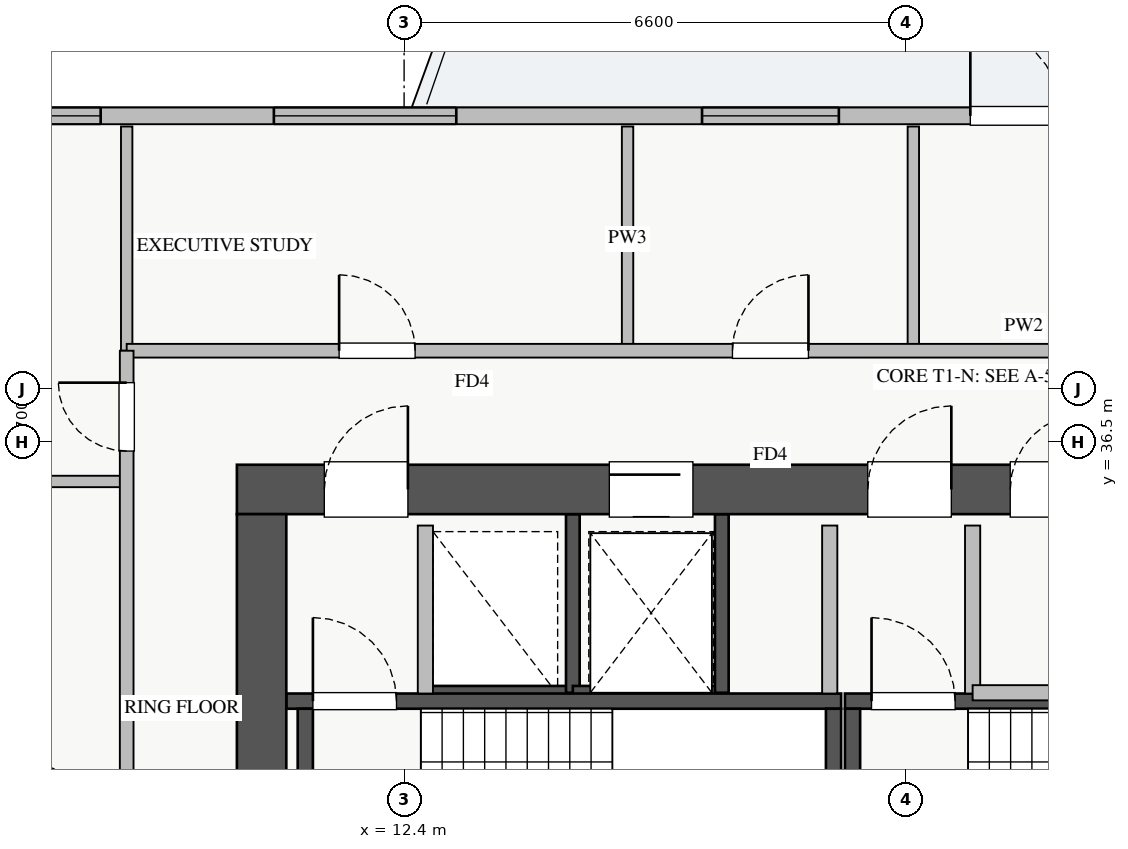
"""IFC4 building model, lengths in metres.
Left out: names, types, materials, properties, quantities, classifications, styles, units other than length and angle.
Written with IfcOpenShell. Run it as: python <this file> out.ifc"""

import sys

from ifc_helpers import new_model, si_unit, direction, frame, frame_2d, origin, place, context, subcontext, project, spatial, rectangle, extrude, source, transform, mapped, element, fill, save


model = new_model("IFC4")
c1 = context("Model", 3, precision=1e-05, world=origin(), true_north=direction((0.0, 1.0)))
c2 = subcontext(c1, "Body", "Model", "MODEL_VIEW")
j1 = project(units=[si_unit("LENGTHUNIT", "METRE"), si_unit("PLANEANGLEUNIT", "RADIAN")], contexts=[c1])
p1 = place(None, origin())
s1 = spatial("IfcSite", under=j1, at=p1, CompositionType="ELEMENT")
p2 = place(p1, origin())
s2 = spatial("IfcBuilding", under=s1, at=p2, CompositionType="ELEMENT")
p3 = place(p2, frame((0.0, 0.0, 147.0)))
s3 = spatial("IfcBuildingStorey", under=s2, at=p3, CompositionType="ELEMENT", Elevation=147.0)
p4 = place(p3, frame((12.68, 33.2, 0.0), z_axis=(0.0, 0.0, 1.0), x_axis=(1.0, 0.0, 0.0)))
e1 = element("IfcWall", 1, at=p4, inside=s3, PredefinedType="SHEAR", context=c2, shape_type="SweptSolid", body=[
    extrude(rectangle(XDim=1.94, YDim=0.18, at=frame_2d((0.97, 0.0))), origin(), (0.0, 0.0, 1.0), 3.07),
])
p5 = place(p3, frame((14.62, 33.2, 0.0), z_axis=(0.0, 0.0, 1.0), x_axis=(0.0, 1.0, 0.0)))
e2 = element("IfcWall", 2, at=p5, inside=s3, PredefinedType="SHEAR", context=c2, shape_type="SweptSolid", body=[
    extrude(rectangle(XDim=2.35, YDim=0.18, at=frame_2d((1.175, 0.0))), origin(), (0.0, 0.0, 1.0), 3.07),
])
p6 = place(p3, frame((14.62, 33.2, 0.0), z_axis=(0.0, 0.0, 1.0), x_axis=(1.0, 0.0, 0.0)))
e3 = element("IfcWall", 3, at=p6, inside=s3, PredefinedType="SHEAR", context=c2, shape_type="SweptSolid", body=[
    extrude(rectangle(XDim=1.96, YDim=0.18, at=frame_2d((0.98, 0.0))), origin(), (0.0, 0.0, 1.0), 3.07),
])
p7 = place(p3, frame((16.58, 33.2, 0.0), z_axis=(0.0, 0.0, 1.0), x_axis=(0.0, 1.0, 0.0)))
e4 = element("IfcWall", 4, at=p7, inside=s3, PredefinedType="SHEAR", context=c2, shape_type="SweptSolid", body=[
    extrude(rectangle(XDim=2.35, YDim=0.18, at=frame_2d((1.175, 0.0))), origin(), (0.0, 0.0, 1.0), 3.07),
])
p8 = place(p3, frame((10.85, 33.09, 0.0), z_axis=(0.0, 0.0, 1.0), x_axis=(1.0, 0.0, 0.0)))
e5 = element("IfcWall", 5, at=p8, inside=s3, PredefinedType="SHEAR", context=c2, shape_type="SweptSolid", body=[
    extrude(rectangle(XDim=7.3, YDim=0.2, at=frame_2d((3.65, 0.0))), origin(), (0.0, 0.0, 1.0), 3.25),
])
p9 = place(p8, frame((0.35, 0.0, 0.0)))
e6 = element("IfcOpeningElement", 6, at=p9, cuts=e5, PredefinedType="OPENING", context=c2, shape_type="SweptSolid", body=[
    extrude(rectangle(XDim=1.1, YDim=2.05, at=frame_2d((0.55, 1.025))), frame((0.0, 0.11, 0.0), z_axis=(0.0, -1.0, 0.0), x_axis=(1.0, 0.0, 0.0)), (0.0, 0.0, 1.0), 0.22),
])
for number, where, z_axis, x_axis in (
    (7, (11.1, 30.05, 0.0), (0.0, 0.0, 1.0), (0.0, 1.0, 0.0)),
    (8, (18.05, 30.05, 0.0), (0.0, 0.0, 1.0), (0.0, 1.0, 0.0)),
):
    element("IfcWall", number, at=place(p3, frame(where, z_axis=z_axis, x_axis=x_axis)), inside=s3, PredefinedType="SHEAR", context=c2, shape_type="SweptSolid", body=[
        extrude(rectangle(XDim=2.94, YDim=0.2, at=frame_2d((1.47, 0.0))), origin(), (0.0, 0.0, 1.0), 3.25),
    ])
p10 = place(p3, frame((18.2, 33.09, 0.0), z_axis=(0.0, 0.0, 1.0), x_axis=(1.0, 0.0, 0.0)))
e9 = element("IfcWall", 9, at=p10, inside=s3, PredefinedType="SHEAR", context=c2, shape_type="SweptSolid", body=[
    extrude(rectangle(XDim=7.15, YDim=0.2, at=frame_2d((3.575, 0.0))), origin(), (0.0, 0.0, 1.0), 3.25),
])
p11 = place(p10, frame((0.35, 0.0, 0.0)))
e10 = element("IfcOpeningElement", 10, at=p11, cuts=e9, PredefinedType="OPENING", context=c2, shape_type="SweptSolid", body=[
    extrude(rectangle(XDim=1.1, YDim=2.05, at=frame_2d((0.55, 1.025))), frame((0.0, 0.11, 0.0), z_axis=(0.0, -1.0, 0.0), x_axis=(1.0, 0.0, 0.0)), (0.0, 0.0, 1.0), 0.22),
])
p12 = place(p3, frame((18.3, 30.05, 0.0), z_axis=(0.0, 0.0, 1.0), x_axis=(0.0, 1.0, 0.0)))
e11 = element("IfcWall", 11, at=p12, inside=s3, PredefinedType="SHEAR", context=c2, shape_type="SweptSolid", body=[
    extrude(rectangle(XDim=2.94, YDim=0.2, at=frame_2d((1.47, 0.0))), origin(), (0.0, 0.0, 1.0), 3.25),
])
p13 = place(p3, frame((10.2, 35.875, 0.0), z_axis=(0.0, 0.0, 1.0), x_axis=(1.0, 0.0, 0.0)))
e12 = element("IfcWall", 12, at=p13, inside=s3, PredefinedType="SHEAR", context=c2, shape_type="SweptSolid", body=[
    extrude(rectangle(XDim=17.6, YDim=0.65, at=frame_2d((8.8, 0.0))), origin(), (0.0, 0.0, 1.0), 3.25),
])
p14 = place(p13, frame((1.15, 0.0, 0.0)))
e13 = element("IfcOpeningElement", 13, at=p14, cuts=e12, PredefinedType="OPENING", context=c2, shape_type="SweptSolid", body=[
    extrude(rectangle(XDim=1.1, YDim=2.05, at=frame_2d((0.55, 1.025))), frame((0.0, 0.335, 0.0), z_axis=(0.0, -1.0, 0.0), x_axis=(1.0, 0.0, 0.0)), (0.0, 0.0, 1.0), 0.67),
])
p15 = place(p13, frame((8.3, 0.0, 0.0)))
e14 = element("IfcOpeningElement", 14, at=p15, cuts=e12, PredefinedType="OPENING", context=c2, shape_type="SweptSolid", body=[
    extrude(rectangle(XDim=1.1, YDim=2.05, at=frame_2d((0.55, 1.025))), frame((0.0, 0.335, 0.0), z_axis=(0.0, -1.0, 0.0), x_axis=(1.0, 0.0, 0.0)), (0.0, 0.0, 1.0), 0.67),
])
p16 = place(p13, frame((4.9, 0.0, 0.0)))
e15 = element("IfcOpeningElement", 15, at=p16, cuts=e12, PredefinedType="OPENING", context=c2, shape_type="SweptSolid", body=[
    extrude(rectangle(XDim=1.1, YDim=2.05, at=frame_2d((0.55, 1.025))), frame((0.0, 0.335, 0.0), z_axis=(0.0, -1.0, 0.0), x_axis=(1.0, 0.0, 0.0)), (0.0, 0.0, 1.0), 0.67),
])
p17 = place(p13, frame((14.74, 0.0, 0.0)))
e16 = element("IfcOpeningElement", 16, at=p17, cuts=e12, PredefinedType="OPENING", context=c2, shape_type="SweptSolid", body=[
    extrude(rectangle(XDim=1.0, YDim=2.05, at=frame_2d((0.5, 1.025))), frame((0.0, 0.335, 0.0), z_axis=(0.0, -1.0, 0.0), x_axis=(1.0, 0.0, 0.0)), (0.0, 0.0, 1.0), 0.67),
])
p18 = place(p13, frame((10.175, 0.0, 0.0)))
e17 = element("IfcOpeningElement", 17, at=p18, cuts=e12, PredefinedType="OPENING", context=c2, shape_type="SweptSolid", body=[
    extrude(rectangle(XDim=1.0, YDim=2.05, at=frame_2d((0.5, 1.025))), frame((0.0, 0.335, 0.0), z_axis=(0.0, -1.0, 0.0), x_axis=(1.0, 0.0, 0.0)), (0.0, 0.0, 1.0), 0.67),
])
p19 = place(p13, frame((12.625, 0.0, 0.0)))
e18 = element("IfcOpeningElement", 18, at=p19, cuts=e12, PredefinedType="OPENING", context=c2, shape_type="SweptSolid", body=[
    extrude(rectangle(XDim=1.0, YDim=2.05, at=frame_2d((0.5, 1.025))), frame((0.0, 0.335, 0.0), z_axis=(0.0, -1.0, 0.0), x_axis=(1.0, 0.0, 0.0)), (0.0, 0.0, 1.0), 0.67),
])
p20 = place(p3, frame((10.525, 29.65, 0.0), z_axis=(0.0, 0.0, 1.0), x_axis=(0.0, 1.0, 0.0)))
e19 = element("IfcWall", 19, at=p20, inside=s3, PredefinedType="SHEAR", context=c2, shape_type="SweptSolid", body=[
    extrude(rectangle(XDim=5.9, YDim=0.65, at=frame_2d((2.95, 0.0))), origin(), (0.0, 0.0, 1.0), 3.25),
])
p21 = place(p3, frame((6.55, 40.79, 0.0), z_axis=(0.0, 0.0, 1.0), x_axis=(1.0, 0.0, 0.0)))
e20 = element("IfcWall", 20, at=p21, inside=s3, PredefinedType="STANDARD", context=c2, shape_type="SweptSolid", body=[
    extrude(rectangle(XDim=24.9, YDim=0.22, at=frame_2d((12.45, 0.0))), origin(), (0.0, 0.0, 1.0), 2.61),
])
p22 = place(p21, frame((13.3, 0.0, 0.0)))
e21 = element("IfcOpeningElement", 21, at=p22, cuts=e20, PredefinedType="OPENING", context=c2, shape_type="SweptSolid", body=[
    extrude(rectangle(XDim=1.2, YDim=2.1, at=frame_2d((0.6, 1.05))), frame((0.0, 0.12, 0.0), z_axis=(0.0, -1.0, 0.0), x_axis=(1.0, 0.0, 0.0)), (0.0, 0.0, 1.0), 0.24),
])
p23 = place(p21, frame((0.357, 0.0, 0.9)))
e22 = element("IfcOpeningElement", 22, at=p23, cuts=e20, PredefinedType="OPENING", context=c2, shape_type="SweptSolid", body=[
    extrude(rectangle(XDim=1.5, YDim=1.5, at=frame_2d((0.75, 0.75))), frame((0.0, 0.12, 0.0), z_axis=(0.0, -1.0, 0.0), x_axis=(1.0, 0.0, 0.0)), (0.0, 0.0, 1.0), 0.24),
])
p24 = place(p21, frame((9.77, 0.0, 0.9)))
e23 = element("IfcOpeningElement", 23, at=p24, cuts=e20, PredefinedType="OPENING", context=c2, shape_type="SweptSolid", body=[
    extrude(rectangle(XDim=1.8, YDim=1.5, at=frame_2d((0.9, 0.75))), frame((0.0, 0.12, 0.0), z_axis=(0.0, -1.0, 0.0), x_axis=(1.0, 0.0, 0.0)), (0.0, 0.0, 1.0), 0.24),
])
p25 = place(p21, frame((14.813, 0.0, 0.9)))
e24 = element("IfcOpeningElement", 24, at=p25, cuts=e20, PredefinedType="OPENING", context=c2, shape_type="SweptSolid", body=[
    extrude(rectangle(XDim=1.5, YDim=1.45, at=frame_2d((0.75, 0.725))), frame((0.0, 0.12, 0.0), z_axis=(0.0, -1.0, 0.0), x_axis=(1.0, 0.0, 0.0)), (0.0, 0.0, 1.0), 0.24),
])
p26 = place(p21, frame((20.738, 0.0, 0.9)))
e25 = element("IfcOpeningElement", 25, at=p26, cuts=e20, PredefinedType="OPENING", context=c2, shape_type="SweptSolid", body=[
    extrude(rectangle(XDim=2.1, YDim=1.48, at=frame_2d((1.05, 0.74))), frame((0.0, 0.12, 0.0), z_axis=(0.0, -1.0, 0.0), x_axis=(1.0, 0.0, 0.0)), (0.0, 0.0, 1.0), 0.24),
])
p27 = place(p21, frame((4.136, 0.0, 0.9)))
e26 = element("IfcOpeningElement", 26, at=p27, cuts=e20, PredefinedType="OPENING", context=c2, shape_type="SweptSolid", body=[
    extrude(rectangle(XDim=2.4, YDim=1.5, at=frame_2d((1.2, 0.75))), frame((0.0, 0.12, 0.0), z_axis=(0.0, -1.0, 0.0), x_axis=(1.0, 0.0, 0.0)), (0.0, 0.0, 1.0), 0.24),
])
for number, where, z_axis, x_axis in (
    (27, (12.68, 33.19, 0.0), (0.0, 0.0, 1.0), (0.0, 1.0, 0.0)),
    (28, (18.0, 33.19, 0.0), (0.0, 0.0, 1.0), (0.0, 1.0, 0.0)),
    (29, (19.88, 33.19, 0.0), (0.0, 0.0, 1.0), (0.0, 1.0, 0.0)),
):
    element("IfcWall", number, at=place(p3, frame(where, z_axis=z_axis, x_axis=x_axis)), inside=s3, PredefinedType="PARTITIONING", context=c2, shape_type="SweptSolid", body=[
        extrude(rectangle(XDim=2.21, YDim=0.2, at=frame_2d((1.105, 0.0))), origin(), (0.0, 0.0, 1.0), 3.07),
    ])
p28 = place(p3, frame((19.88, 33.2, 0.0), z_axis=(0.0, 0.0, 1.0), x_axis=(1.0, 0.0, 0.0)))
e30 = element("IfcWall", 30, at=p28, inside=s3, PredefinedType="PARTITIONING", context=c2, shape_type="SweptSolid", body=[
    extrude(rectangle(XDim=1.87, YDim=0.2, at=frame_2d((0.935, 0.0))), origin(), (0.0, 0.0, 1.0), 3.07),
])
p29 = place(p3, frame((15.34, 37.7, 0.0), z_axis=(0.0, 0.0, 1.0), x_axis=(0.0, 1.0, 0.0)))
e31 = element("IfcWall", 31, at=p29, inside=s3, PredefinedType="PARTITIONING", context=c2, shape_type="SweptSolid", body=[
    extrude(rectangle(XDim=2.95, YDim=0.15, at=frame_2d((1.475, 0.0))), origin(), (0.0, 0.0, 1.0), 3.07),
])
p30 = place(p3, frame((19.1, 37.7, 0.0), z_axis=(0.0, 0.0, 1.0), x_axis=(0.0, 1.0, 0.0)))
e32 = element("IfcWall", 32, at=p30, inside=s3, PredefinedType="PARTITIONING", context=c2, shape_type="SweptSolid", body=[
    extrude(rectangle(XDim=2.95, YDim=0.15, at=frame_2d((1.475, 0.0))), origin(), (0.0, 0.0, 1.0), 2.715),
])
p31 = place(p3, frame((8.75, 37.7, 0.0), z_axis=(0.0, 0.0, 1.0), x_axis=(0.0, 1.0, 0.0)))
e33 = element("IfcWall", 33, at=p31, inside=s3, PredefinedType="PARTITIONING", context=c2, shape_type="SweptSolid", body=[
    extrude(rectangle(XDim=2.95, YDim=0.15, at=frame_2d((1.475, 0.0))), origin(), (0.0, 0.0, 1.0), 3.07),
])
p32 = place(p3, frame((8.75, 37.7, 0.0), z_axis=(0.0, 0.0, 1.0), x_axis=(1.0, 0.0, 0.0)))
e34 = element("IfcWall", 34, at=p32, inside=s3, PredefinedType="PARTITIONING", context=c2, shape_type="SweptSolid", body=[
    extrude(rectangle(XDim=23.61, YDim=0.18, at=frame_2d((11.805, 0.0))), origin(), (0.0, 0.0, 1.0), 3.07),
])
p33 = place(p32, frame((2.795, 0.0, 0.0)))
e35 = element("IfcOpeningElement", 35, at=p33, cuts=e34, PredefinedType="OPENING", context=c2, shape_type="SweptSolid", body=[
    extrude(rectangle(XDim=1.0, YDim=2.05, at=frame_2d((0.5, 1.025))), frame((0.0, 0.1, 0.0), z_axis=(0.0, -1.0, 0.0), x_axis=(1.0, 0.0, 0.0)), (0.0, 0.0, 1.0), 0.2),
])
p34 = place(p32, frame((7.97, 0.0, 0.0)))
e36 = element("IfcOpeningElement", 36, at=p34, cuts=e34, PredefinedType="OPENING", context=c2, shape_type="SweptSolid", body=[
    extrude(rectangle(XDim=1.0, YDim=2.05, at=frame_2d((0.5, 1.025))), frame((0.0, 0.1, 0.0), z_axis=(0.0, -1.0, 0.0), x_axis=(1.0, 0.0, 0.0)), (0.0, 0.0, 1.0), 0.2),
])
p35 = place(p32, frame((13.385, 0.0, 0.0)))
e37 = element("IfcOpeningElement", 37, at=p35, cuts=e34, PredefinedType="OPENING", context=c2, shape_type="SweptSolid", body=[
    extrude(rectangle(XDim=1.0, YDim=2.05, at=frame_2d((0.5, 1.025))), frame((0.0, 0.1, 0.0), z_axis=(0.0, -1.0, 0.0), x_axis=(1.0, 0.0, 0.0)), (0.0, 0.0, 1.0), 0.2),
])
p36 = place(p32, frame((19.825, 0.0, 0.0)))
e38 = element("IfcOpeningElement", 38, at=p36, cuts=e34, PredefinedType="OPENING", context=c2, shape_type="SweptSolid", body=[
    extrude(rectangle(XDim=1.0, YDim=2.05, at=frame_2d((0.5, 1.025))), frame((0.0, 0.1, 0.0), z_axis=(0.0, -1.0, 0.0), x_axis=(1.0, 0.0, 0.0)), (0.0, 0.0, 1.0), 0.2),
])
p37 = place(p3, frame((1.35, 35.98, 0.0), z_axis=(0.0, 0.0, 1.0), x_axis=(1.0, 0.0, 0.0)))
e39 = element("IfcWall", 39, at=p37, inside=s3, PredefinedType="PARTITIONING", context=c2, shape_type="SweptSolid", body=[
    extrude(rectangle(XDim=7.4, YDim=0.15, at=frame_2d((3.7, 0.0))), origin(), (0.0, 0.0, 1.0), 3.07),
])
p38 = place(p3, frame((8.75, 8.3, 0.0), z_axis=(0.0, 0.0, 1.0), x_axis=(0.0, 1.0, 0.0)))
e40 = element("IfcWall", 40, at=p38, inside=s3, PredefinedType="PARTITIONING", context=c2, shape_type="SweptSolid", body=[
    extrude(rectangle(XDim=29.4, YDim=0.18, at=frame_2d((14.7, 0.0))), origin(), (0.0, 0.0, 1.0), 3.07),
])
p39 = place(p38, frame((28.08, 0.0, 0.0)))
e41 = element("IfcOpeningElement", 41, at=p39, cuts=e40, PredefinedType="OPENING", context=c2, shape_type="SweptSolid", body=[
    extrude(rectangle(XDim=0.9, YDim=2.05, at=frame_2d((0.45, 1.025))), frame((0.0, 0.1, 0.0), z_axis=(0.0, -1.0, 0.0), x_axis=(1.0, 0.0, 0.0)), (0.0, 0.0, 1.0), 0.2),
])
p40 = place(p38, frame((0.245, 0.0, 0.0)))
e42 = element("IfcOpeningElement", 42, at=p40, cuts=e40, PredefinedType="OPENING", context=c2, shape_type="SweptSolid", body=[
    extrude(rectangle(XDim=0.9, YDim=2.05, at=frame_2d((0.45, 1.025))), frame((0.0, 0.1, 0.0), z_axis=(0.0, -1.0, 0.0), x_axis=(1.0, 0.0, 0.0)), (0.0, 0.0, 1.0), 0.2),
])
p41 = place(p38, frame((5.0, 0.0, 0.0)))
e43 = element("IfcOpeningElement", 43, at=p41, cuts=e40, PredefinedType="OPENING", context=c2, shape_type="SweptSolid", body=[
    extrude(rectangle(XDim=1.0, YDim=2.05, at=frame_2d((0.5, 1.025))), frame((0.0, 0.1, 0.0), z_axis=(0.0, -1.0, 0.0), x_axis=(1.0, 0.0, 0.0)), (0.0, 0.0, 1.0), 0.2),
])
p42 = place(p38, frame((11.165, 0.0, 0.0)))
e44 = element("IfcOpeningElement", 44, at=p42, cuts=e40, PredefinedType="OPENING", context=c2, shape_type="SweptSolid", body=[
    extrude(rectangle(XDim=1.0, YDim=2.05, at=frame_2d((0.5, 1.025))), frame((0.0, 0.1, 0.0), z_axis=(0.0, -1.0, 0.0), x_axis=(1.0, 0.0, 0.0)), (0.0, 0.0, 1.0), 0.2),
])
p43 = place(p38, frame((20.325, 0.0, 0.0)))
e45 = element("IfcOpeningElement", 45, at=p43, cuts=e40, PredefinedType="OPENING", context=c2, shape_type="SweptSolid", body=[
    extrude(rectangle(XDim=1.0, YDim=2.05, at=frame_2d((0.5, 1.025))), frame((0.0, 0.1, 0.0), z_axis=(0.0, -1.0, 0.0), x_axis=(1.0, 0.0, 0.0)), (0.0, 0.0, 1.0), 0.2),
])
m1 = source(origin(), c2, "Body", "SweptSolid", [
    extrude(rectangle(XDim=1.2, YDim=2.1, at=frame_2d((0.6, 1.05))), frame((0.0, 0.025, 0.0), z_axis=(0.0, -1.0, 0.0), x_axis=(1.0, 0.0, 0.0)), (0.0, 0.0, 1.0), 0.05),
])
p44 = place(p22, origin())
e46 = element("IfcDoor", 46, at=p44, inside=s3, OperationType="SINGLE_SWING_LEFT", PredefinedType="DOOR", context=c2, shape_type="MappedRepresentation", body=[
    mapped(m1, transform((0.0, 0.0, 0.0), x_axis=(1.0, 0.0, 0.0), y_axis=(0.0, 1.0, 0.0), z_axis=(0.0, 0.0, 1.0), scale=1.0)),
])
fill(e21, e46)
m2 = source(origin(), c2, "Body", "SweptSolid", [
    extrude(rectangle(XDim=1.5, YDim=1.5, at=frame_2d((0.75, 0.75))), frame((0.0, 0.03, 0.0), z_axis=(0.0, -1.0, 0.0), x_axis=(1.0, 0.0, 0.0)), (0.0, 0.0, 1.0), 0.06),
])
p45 = place(p23, origin())
e47 = element("IfcWindow", 47, at=p45, inside=s3, PartitioningType="TRIPLE_PANEL_VERTICAL", PredefinedType="WINDOW", context=c2, shape_type="MappedRepresentation", body=[
    mapped(m2, transform((0.0, 0.0, 0.0), x_axis=(1.0, 0.0, 0.0), y_axis=(0.0, 1.0, 0.0), z_axis=(0.0, 0.0, 1.0), scale=1.0)),
])
fill(e22, e47)
m3 = source(origin(), c2, "Body", "SweptSolid", [
    extrude(rectangle(XDim=1.8, YDim=1.5, at=frame_2d((0.9, 0.75))), frame((0.0, 0.03, 0.0), z_axis=(0.0, -1.0, 0.0), x_axis=(1.0, 0.0, 0.0)), (0.0, 0.0, 1.0), 0.06),
])
p46 = place(p24, origin())
e48 = element("IfcWindow", 48, at=p46, inside=s3, PartitioningType="DOUBLE_PANEL_VERTICAL", PredefinedType="WINDOW", context=c2, shape_type="MappedRepresentation", body=[
    mapped(m3, transform((0.0, 0.0, 0.0), x_axis=(1.0, 0.0, 0.0), y_axis=(0.0, 1.0, 0.0), z_axis=(0.0, 0.0, 1.0), scale=1.0)),
])
fill(e23, e48)
m4 = source(origin(), c2, "Body", "SweptSolid", [
    extrude(rectangle(XDim=1.1, YDim=2.05, at=frame_2d((0.55, 1.025))), frame((0.0, 0.025, 0.0), z_axis=(0.0, -1.0, 0.0), x_axis=(1.0, 0.0, 0.0)), (0.0, 0.0, 1.0), 0.05),
])
p47 = place(p14, origin())
e49 = element("IfcDoor", 49, at=p47, inside=s3, OperationType="SINGLE_SWING_RIGHT", PredefinedType="DOOR", context=c2, shape_type="MappedRepresentation", body=[
    mapped(m4, transform((0.0, 0.0, 0.0), x_axis=(1.0, 0.0, 0.0), y_axis=(0.0, 1.0, 0.0), z_axis=(0.0, 0.0, 1.0), scale=1.0)),
])
fill(e13, e49)
p48 = place(p9, origin())
e50 = element("IfcDoor", 50, at=p48, inside=s3, OperationType="SINGLE_SWING_LEFT", PredefinedType="DOOR", context=c2, shape_type="MappedRepresentation", body=[
    mapped(m4, transform((0.0, 0.0, 0.0), x_axis=(1.0, 0.0, 0.0), y_axis=(0.0, 1.0, 0.0), z_axis=(0.0, 0.0, 1.0), scale=1.0)),
])
fill(e6, e50)
p49 = place(p15, origin())
e51 = element("IfcDoor", 51, at=p49, inside=s3, OperationType="SINGLE_SWING_RIGHT", PredefinedType="DOOR", context=c2, shape_type="MappedRepresentation", body=[
    mapped(m4, transform((0.0, 0.0, 0.0), x_axis=(1.0, 0.0, 0.0), y_axis=(0.0, 1.0, 0.0), z_axis=(0.0, 0.0, 1.0), scale=1.0)),
])
fill(e14, e51)
p50 = place(p11, origin())
e52 = element("IfcDoor", 52, at=p50, inside=s3, OperationType="SINGLE_SWING_LEFT", PredefinedType="DOOR", context=c2, shape_type="MappedRepresentation", body=[
    mapped(m4, transform((0.0, 0.0, 0.0), x_axis=(1.0, 0.0, 0.0), y_axis=(0.0, 1.0, 0.0), z_axis=(0.0, 0.0, 1.0), scale=1.0)),
])
fill(e10, e52)
p51 = place(p16, origin())
e53 = element("IfcDoor", 53, at=p51, inside=s3, OperationType="SLIDING_TO_LEFT", PredefinedType="DOOR", context=c2, shape_type="MappedRepresentation", body=[
    mapped(m4, transform((0.0, 0.0, 0.0), x_axis=(1.0, 0.0, 0.0), y_axis=(0.0, 1.0, 0.0), z_axis=(0.0, 0.0, 1.0), scale=1.0)),
])
fill(e15, e53)
m5 = source(origin(), c2, "Body", "SweptSolid", [
    extrude(rectangle(XDim=1.0, YDim=2.05, at=frame_2d((0.5, 1.025))), frame((0.0, 0.025, 0.0), z_axis=(0.0, -1.0, 0.0), x_axis=(1.0, 0.0, 0.0)), (0.0, 0.0, 1.0), 0.05),
])
p52 = place(p18, origin())
e54 = element("IfcDoor", 54, at=p52, inside=s3, OperationType="SINGLE_SWING_RIGHT", PredefinedType="DOOR", context=c2, shape_type="MappedRepresentation", body=[
    mapped(m5, transform((0.0, 0.0, 0.0), x_axis=(1.0, 0.0, 0.0), y_axis=(0.0, 1.0, 0.0), z_axis=(0.0, 0.0, 1.0), scale=1.0)),
])
fill(e17, e54)
p53 = place(p33, origin())
e55 = element("IfcDoor", 55, at=p53, inside=s3, OperationType="SINGLE_SWING_LEFT", PredefinedType="DOOR", context=c2, shape_type="MappedRepresentation", body=[
    mapped(m5, transform((0.0, 0.0, 0.0), x_axis=(1.0, 0.0, 0.0), y_axis=(0.0, 1.0, 0.0), z_axis=(0.0, 0.0, 1.0), scale=1.0)),
])
fill(e35, e55)
p54 = place(p34, origin())
e56 = element("IfcDoor", 56, at=p54, inside=s3, OperationType="SINGLE_SWING_RIGHT", PredefinedType="DOOR", context=c2, shape_type="MappedRepresentation", body=[
    mapped(m5, transform((0.0, 0.0, 0.0), x_axis=(1.0, 0.0, 0.0), y_axis=(0.0, 1.0, 0.0), z_axis=(0.0, 0.0, 1.0), scale=1.0)),
])
fill(e36, e56)
m6 = source(origin(), c2, "Body", "SweptSolid", [
    extrude(rectangle(XDim=0.9, YDim=2.05, at=frame_2d((0.45, 1.025))), frame((0.0, 0.025, 0.0), z_axis=(0.0, -1.0, 0.0), x_axis=(1.0, 0.0, 0.0)), (0.0, 0.0, 1.0), 0.05),
])
p55 = place(p39, origin())
e57 = element("IfcDoor", 57, at=p55, inside=s3, OperationType="SINGLE_SWING_RIGHT", PredefinedType="DOOR", context=c2, shape_type="MappedRepresentation", body=[
    mapped(m6, transform((0.0, 0.0, 0.0), x_axis=(1.0, 0.0, 0.0), y_axis=(0.0, 1.0, 0.0), z_axis=(0.0, 0.0, 1.0), scale=1.0)),
])
fill(e41, e57)
m7 = source(origin(), c2, "Body", "SweptSolid", [
    extrude(rectangle(XDim=2.4, YDim=1.5, at=frame_2d((1.2, 0.75))), frame((0.0, 0.03, 0.0), z_axis=(0.0, -1.0, 0.0), x_axis=(1.0, 0.0, 0.0)), (0.0, 0.0, 1.0), 0.06),
])
p56 = place(p27, origin())
e58 = element("IfcWindow", 58, at=p56, inside=s3, PartitioningType="TRIPLE_PANEL_VERTICAL", PredefinedType="WINDOW", context=c2, shape_type="MappedRepresentation", body=[
    mapped(m7, transform((0.0, 0.0, 0.0), x_axis=(1.0, 0.0, 0.0), y_axis=(0.0, 1.0, 0.0), z_axis=(0.0, 0.0, 1.0), scale=1.0)),
])
fill(e26, e58)
save(model, sys.argv[1])
